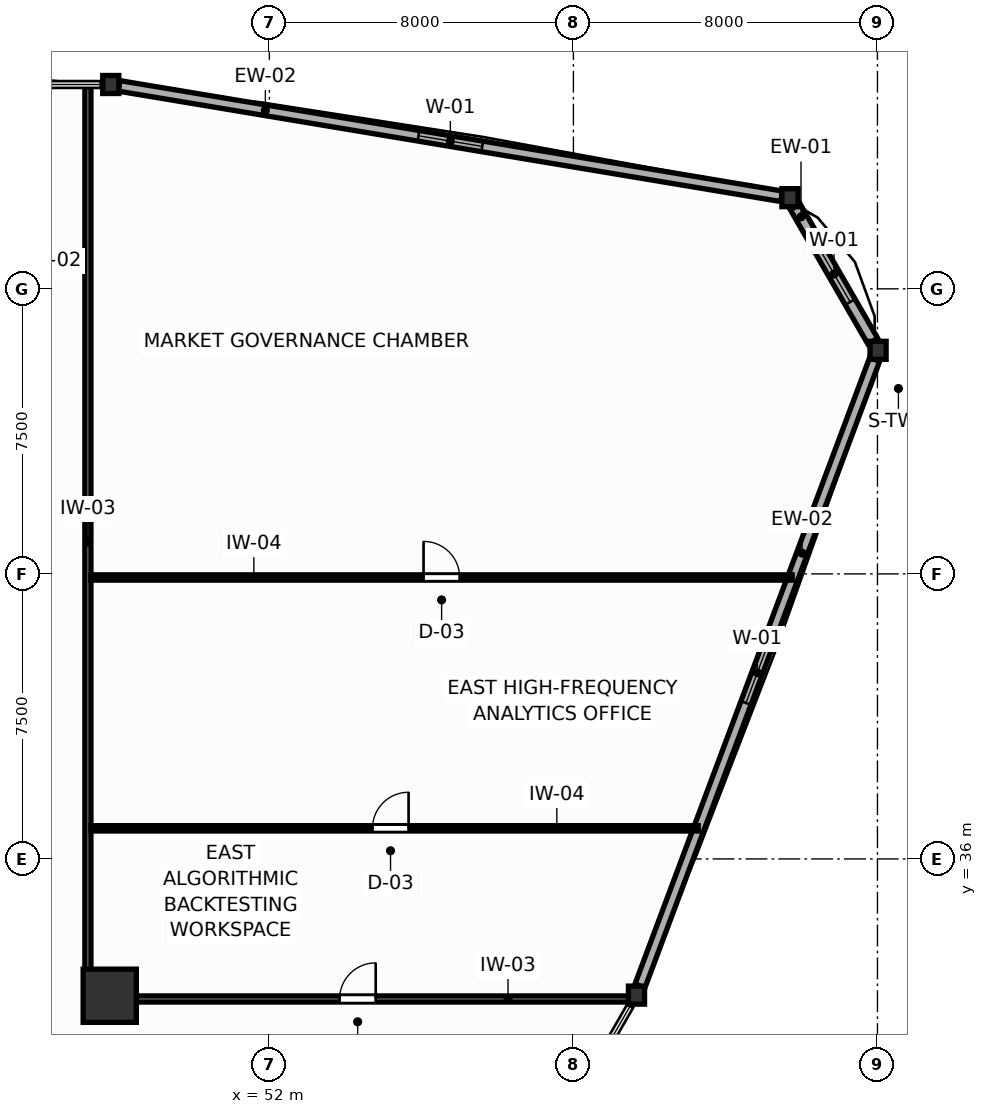
"""IFC4 building model, lengths in metres.
Left out: names, types, materials, properties, quantities, classifications, styles, units other than length and angle.
Written with IfcOpenShell. Run it as: python <this file> out.ifc"""

import sys

from ifc_helpers import new_model, si_unit, direction, frame, frame_2d, origin, origin_2d, place, context, subcontext, project, spatial, rectangle, i_section, extrude, source, transform, mapped, element, fill, save


model = new_model("IFC4")
c1 = context("Model", 3, precision=1e-05, world=origin(), true_north=direction((0.0, 1.0)))
c2 = subcontext(c1, "Body", "Model", "MODEL_VIEW")
j1 = project(units=[si_unit("LENGTHUNIT", "METRE"), si_unit("PLANEANGLEUNIT", "RADIAN")], contexts=[c1])
p1 = place(None, origin())
s1 = spatial("IfcSite", under=j1, at=p1, CompositionType="ELEMENT")
p2 = place(p1, origin())
s2 = spatial("IfcBuilding", under=s1, at=p2, CompositionType="ELEMENT")
p3 = place(p2, frame((0.0, 0.0, 63.9)))
s3 = spatial("IfcBuildingStorey", under=s2, at=p3, CompositionType="ELEMENT", Elevation=63.9)
m1 = source(origin(), c2, "Body", "SweptSolid", [
    extrude(rectangle(XDim=1.4, YDim=1.4, at=origin_2d()), origin(), (0.0, 0.0, 1.0), 3.9),
])
p4 = place(p3, frame((47.8, 32.4, 0.0), z_axis=(0.0, 0.0, 1.0), x_axis=(1.0, 0.0, 0.0)))
e1 = element("IfcColumn", 1, at=p4, inside=s3, PredefinedType="COLUMN", context=c2, shape_type="MappedRepresentation", body=[
    mapped(m1, transform((0.0, 0.0, 0.0), scale=1.0)),
])
m2 = source(origin(), c2, "Body", "SweptSolid", [
    extrude(i_section(OverallWidth=0.424, OverallDepth=0.474, WebThickness=0.045, FlangeThickness=0.072, FilletRadius=0.015, at=origin_2d()), origin(), (0.0, 0.0, 1.0), 3.9),
])
for number, where, z_axis, x_axis in (
    (2, (68.017, 49.382, 0.0), (0.0, 0.0, 1.0), (1.0, 0.0, 0.0)),
    (3, (65.698, 53.399, 0.0), (0.0, 0.0, 1.0), (1.0, 0.0, 0.0)),
    (4, (47.827, 56.377, 0.0), (0.0, 0.0, 1.0), (1.0, 0.0, 0.0)),
    (5, (61.66, 32.417, 0.0), (0.0, 0.0, 1.0), (1.0, 0.0, 0.0)),
):
    element("IfcColumn", number, at=place(p3, frame(where, z_axis=z_axis, x_axis=x_axis)), inside=s3, PredefinedType="COLUMN", context=c2, shape_type="MappedRepresentation", body=[
        mapped(m2, transform((0.0, 0.0, 0.0), scale=1.0)),
    ])
p5 = place(p3, frame((67.877, 49.624, 0.0), z_axis=(0.0, 0.0, 1.0), x_axis=(-0.500014317814, 0.866017137233, 0.0)))
e6 = element("IfcWall", 6, at=p5, inside=s3, PredefinedType="SOLIDWALL", context=c2, shape_type="SweptSolid", body=[
    extrude(rectangle(XDim=4.079, YDim=0.3, at=frame_2d((2.04, 0.0))), origin(), (0.0, 0.0, 1.0), 3.23),
])
p6 = place(p5, frame((1.189, 0.0, 0.75)))
e7 = element("IfcOpeningElement", 7, at=p6, cuts=e6, PredefinedType="OPENING", context=c2, shape_type="SweptSolid", body=[
    extrude(rectangle(XDim=1.7, YDim=1.75, at=frame_2d((0.85, 0.875))), frame((0.0, 0.16, 0.0), z_axis=(0.0, -1.0, 0.0), x_axis=(1.0, 0.0, 0.0)), (0.0, 0.0, 1.0), 0.32),
])
p7 = place(p3, frame((65.481, 53.435, 0.0), z_axis=(0.0, 0.0, 1.0), x_axis=(-0.986399895449, 0.16436315359, 0.0)))
e8 = element("IfcWall", 8, at=p7, inside=s3, PredefinedType="SOLIDWALL", context=c2, shape_type="SweptSolid", body=[
    extrude(rectangle(XDim=17.677, YDim=0.28, at=frame_2d((8.839, 0.0))), origin(), (0.0, 0.0, 1.0), 3.23),
])
p8 = place(p7, frame((7.989, 0.0, 0.75)))
e9 = element("IfcOpeningElement", 9, at=p8, cuts=e8, PredefinedType="OPENING", context=c2, shape_type="SweptSolid", body=[
    extrude(rectangle(XDim=1.7, YDim=1.75, at=frame_2d((0.85, 0.875))), frame((0.0, 0.15, 0.0), z_axis=(0.0, -1.0, 0.0), x_axis=(1.0, 0.0, 0.0)), (0.0, 0.0, 1.0), 0.3),
])
p9 = place(p3, frame((61.751, 32.658, 0.0), z_axis=(0.0, 0.0, 1.0), x_axis=(0.350833077365, 0.936438012805, 0.0)))
e10 = element("IfcWall", 10, at=p9, inside=s3, PredefinedType="SOLIDWALL", context=c2, shape_type="SweptSolid", body=[
    extrude(rectangle(XDim=17.6, YDim=0.28, at=frame_2d((8.8, 0.0))), origin(), (0.0, 0.0, 1.0), 3.23),
])
p10 = place(p9, frame((7.95, 0.0, 0.75)))
e11 = element("IfcOpeningElement", 11, at=p10, cuts=e10, PredefinedType="OPENING", context=c2, shape_type="SweptSolid", body=[
    extrude(rectangle(XDim=1.7, YDim=1.75, at=frame_2d((0.85, 0.875))), frame((0.0, 0.15, 0.0), z_axis=(0.0, -1.0, 0.0), x_axis=(1.0, 0.0, 0.0)), (0.0, 0.0, 1.0), 0.3),
])
p11 = place(p3, frame((47.225, 32.31, 0.0), z_axis=(0.0, 0.0, 1.0), x_axis=(0.0, 1.0, 0.0)))
e12 = element("IfcWall", 12, at=p11, inside=s3, PredefinedType="PARTITIONING", context=c2, shape_type="SweptSolid", body=[
    extrude(rectangle(XDim=24.047, YDim=0.16, at=frame_2d((12.023, 0.0))), origin(), (0.0, 0.0, 1.0), 3.18),
])
p12 = place(p3, frame((47.307, 32.315, 0.0), z_axis=(0.0, 0.0, 1.0), x_axis=(1.0, 0.0, 0.0)))
e13 = element("IfcWall", 13, at=p12, inside=s3, PredefinedType="PARTITIONING", context=c2, shape_type="SweptSolid", body=[
    extrude(rectangle(XDim=14.275, YDim=0.16, at=frame_2d((7.137, 0.0))), origin(), (0.0, 0.0, 1.0), 3.18),
])
p13 = place(p12, frame((6.541, 0.0, 0.0)))
e14 = element("IfcOpeningElement", 14, at=p13, cuts=e13, PredefinedType="OPENING", context=c2, shape_type="SweptSolid", body=[
    extrude(rectangle(XDim=0.95, YDim=2.05, at=frame_2d((0.475, 1.025))), frame((0.0, 0.09, 0.0), z_axis=(0.0, -1.0, 0.0), x_axis=(1.0, 0.0, 0.0)), (0.0, 0.0, 1.0), 0.18),
])
p14 = place(p3, frame((47.307, 43.405, 0.0), z_axis=(0.0, 0.0, 1.0), x_axis=(1.0, 0.0, 0.0)))
e15 = element("IfcWall", 15, at=p14, inside=s3, PredefinedType="PARTITIONING", context=c2, shape_type="SweptSolid", body=[
    extrude(rectangle(XDim=18.45, YDim=0.14, at=frame_2d((9.225, 0.0))), origin(), (0.0, 0.0, 1.0), 3.68),
])
p15 = place(p14, frame((8.75, 0.0, 0.0)))
e16 = element("IfcOpeningElement", 16, at=p15, cuts=e15, PredefinedType="OPENING", context=c2, shape_type="SweptSolid", body=[
    extrude(rectangle(XDim=0.95, YDim=2.05, at=frame_2d((0.475, 1.025))), frame((0.0, 0.08, 0.0), z_axis=(0.0, -1.0, 0.0), x_axis=(1.0, 0.0, 0.0)), (0.0, 0.0, 1.0), 0.16),
])
p16 = place(p3, frame((47.307, 36.805, 0.0), z_axis=(0.0, 0.0, 1.0), x_axis=(1.0, 0.0, 0.0)))
e17 = element("IfcWall", 17, at=p16, inside=s3, PredefinedType="PARTITIONING", context=c2, shape_type="SweptSolid", body=[
    extrude(rectangle(XDim=15.978, YDim=0.14, at=frame_2d((7.989, 0.0))), origin(), (0.0, 0.0, 1.0), 3.68),
])
p17 = place(p16, frame((7.406, 0.0, 0.0)))
e18 = element("IfcOpeningElement", 18, at=p17, cuts=e17, PredefinedType="OPENING", context=c2, shape_type="SweptSolid", body=[
    extrude(rectangle(XDim=0.95, YDim=2.05, at=frame_2d((0.475, 1.025))), frame((0.0, 0.08, 0.0), z_axis=(0.0, -1.0, 0.0), x_axis=(1.0, 0.0, 0.0)), (0.0, 0.0, 1.0), 0.16),
])
p18 = place(p6, origin())
e19 = element("IfcWindow", 19, at=p18, inside=s3, PartitioningType="SINGLE_PANEL", PredefinedType="WINDOW", context=c2, shape_type="SweptSolid", body=[
    extrude(rectangle(XDim=1.7, YDim=1.75, at=frame_2d((0.85, 0.875))), frame((0.0, 0.03, 0.0), z_axis=(0.0, -1.0, 0.0), x_axis=(1.0, 0.0, 0.0)), (0.0, 0.0, 1.0), 0.06),
])
fill(e7, e19)
p19 = place(p8, origin())
e20 = element("IfcWindow", 20, at=p19, inside=s3, PartitioningType="SINGLE_PANEL", PredefinedType="WINDOW", context=c2, shape_type="SweptSolid", body=[
    extrude(rectangle(XDim=1.7, YDim=1.75, at=frame_2d((0.85, 0.875))), frame((0.0, 0.03, 0.0), z_axis=(0.0, -1.0, 0.0), x_axis=(1.0, 0.0, 0.0)), (0.0, 0.0, 1.0), 0.06),
])
fill(e9, e20)
p20 = place(p10, origin())
e21 = element("IfcWindow", 21, at=p20, inside=s3, PartitioningType="SINGLE_PANEL", PredefinedType="WINDOW", context=c2, shape_type="SweptSolid", body=[
    extrude(rectangle(XDim=1.7, YDim=1.75, at=frame_2d((0.85, 0.875))), frame((0.0, 0.03, 0.0), z_axis=(0.0, -1.0, 0.0), x_axis=(1.0, 0.0, 0.0)), (0.0, 0.0, 1.0), 0.06),
])
fill(e11, e21)
p21 = place(p13, origin())
e22 = element("IfcDoor", 22, at=p21, inside=s3, OperationType="SINGLE_SWING_RIGHT", PredefinedType="DOOR", context=c2, shape_type="SweptSolid", body=[
    extrude(rectangle(XDim=0.95, YDim=2.05, at=frame_2d((0.475, 1.025))), frame((0.0, 0.025, 0.0), z_axis=(0.0, -1.0, 0.0), x_axis=(1.0, 0.0, 0.0)), (0.0, 0.0, 1.0), 0.05),
])
fill(e14, e22)
p22 = place(p15, origin())
e23 = element("IfcDoor", 23, at=p22, inside=s3, OperationType="SINGLE_SWING_LEFT", PredefinedType="DOOR", context=c2, shape_type="SweptSolid", body=[
    extrude(rectangle(XDim=0.95, YDim=2.05, at=frame_2d((0.475, 1.025))), frame((0.0, 0.025, 0.0), z_axis=(0.0, -1.0, 0.0), x_axis=(1.0, 0.0, 0.0)), (0.0, 0.0, 1.0), 0.05),
])
fill(e16, e23)
p23 = place(p17, origin())
e24 = element("IfcDoor", 24, at=p23, inside=s3, OperationType="SINGLE_SWING_RIGHT", PredefinedType="DOOR", context=c2, shape_type="SweptSolid", body=[
    extrude(rectangle(XDim=0.95, YDim=2.05, at=frame_2d((0.475, 1.025))), frame((0.0, 0.025, 0.0), z_axis=(0.0, -1.0, 0.0), x_axis=(1.0, 0.0, 0.0)), (0.0, 0.0, 1.0), 0.05),
])
fill(e18, e24)
save(model, sys.argv[1])
